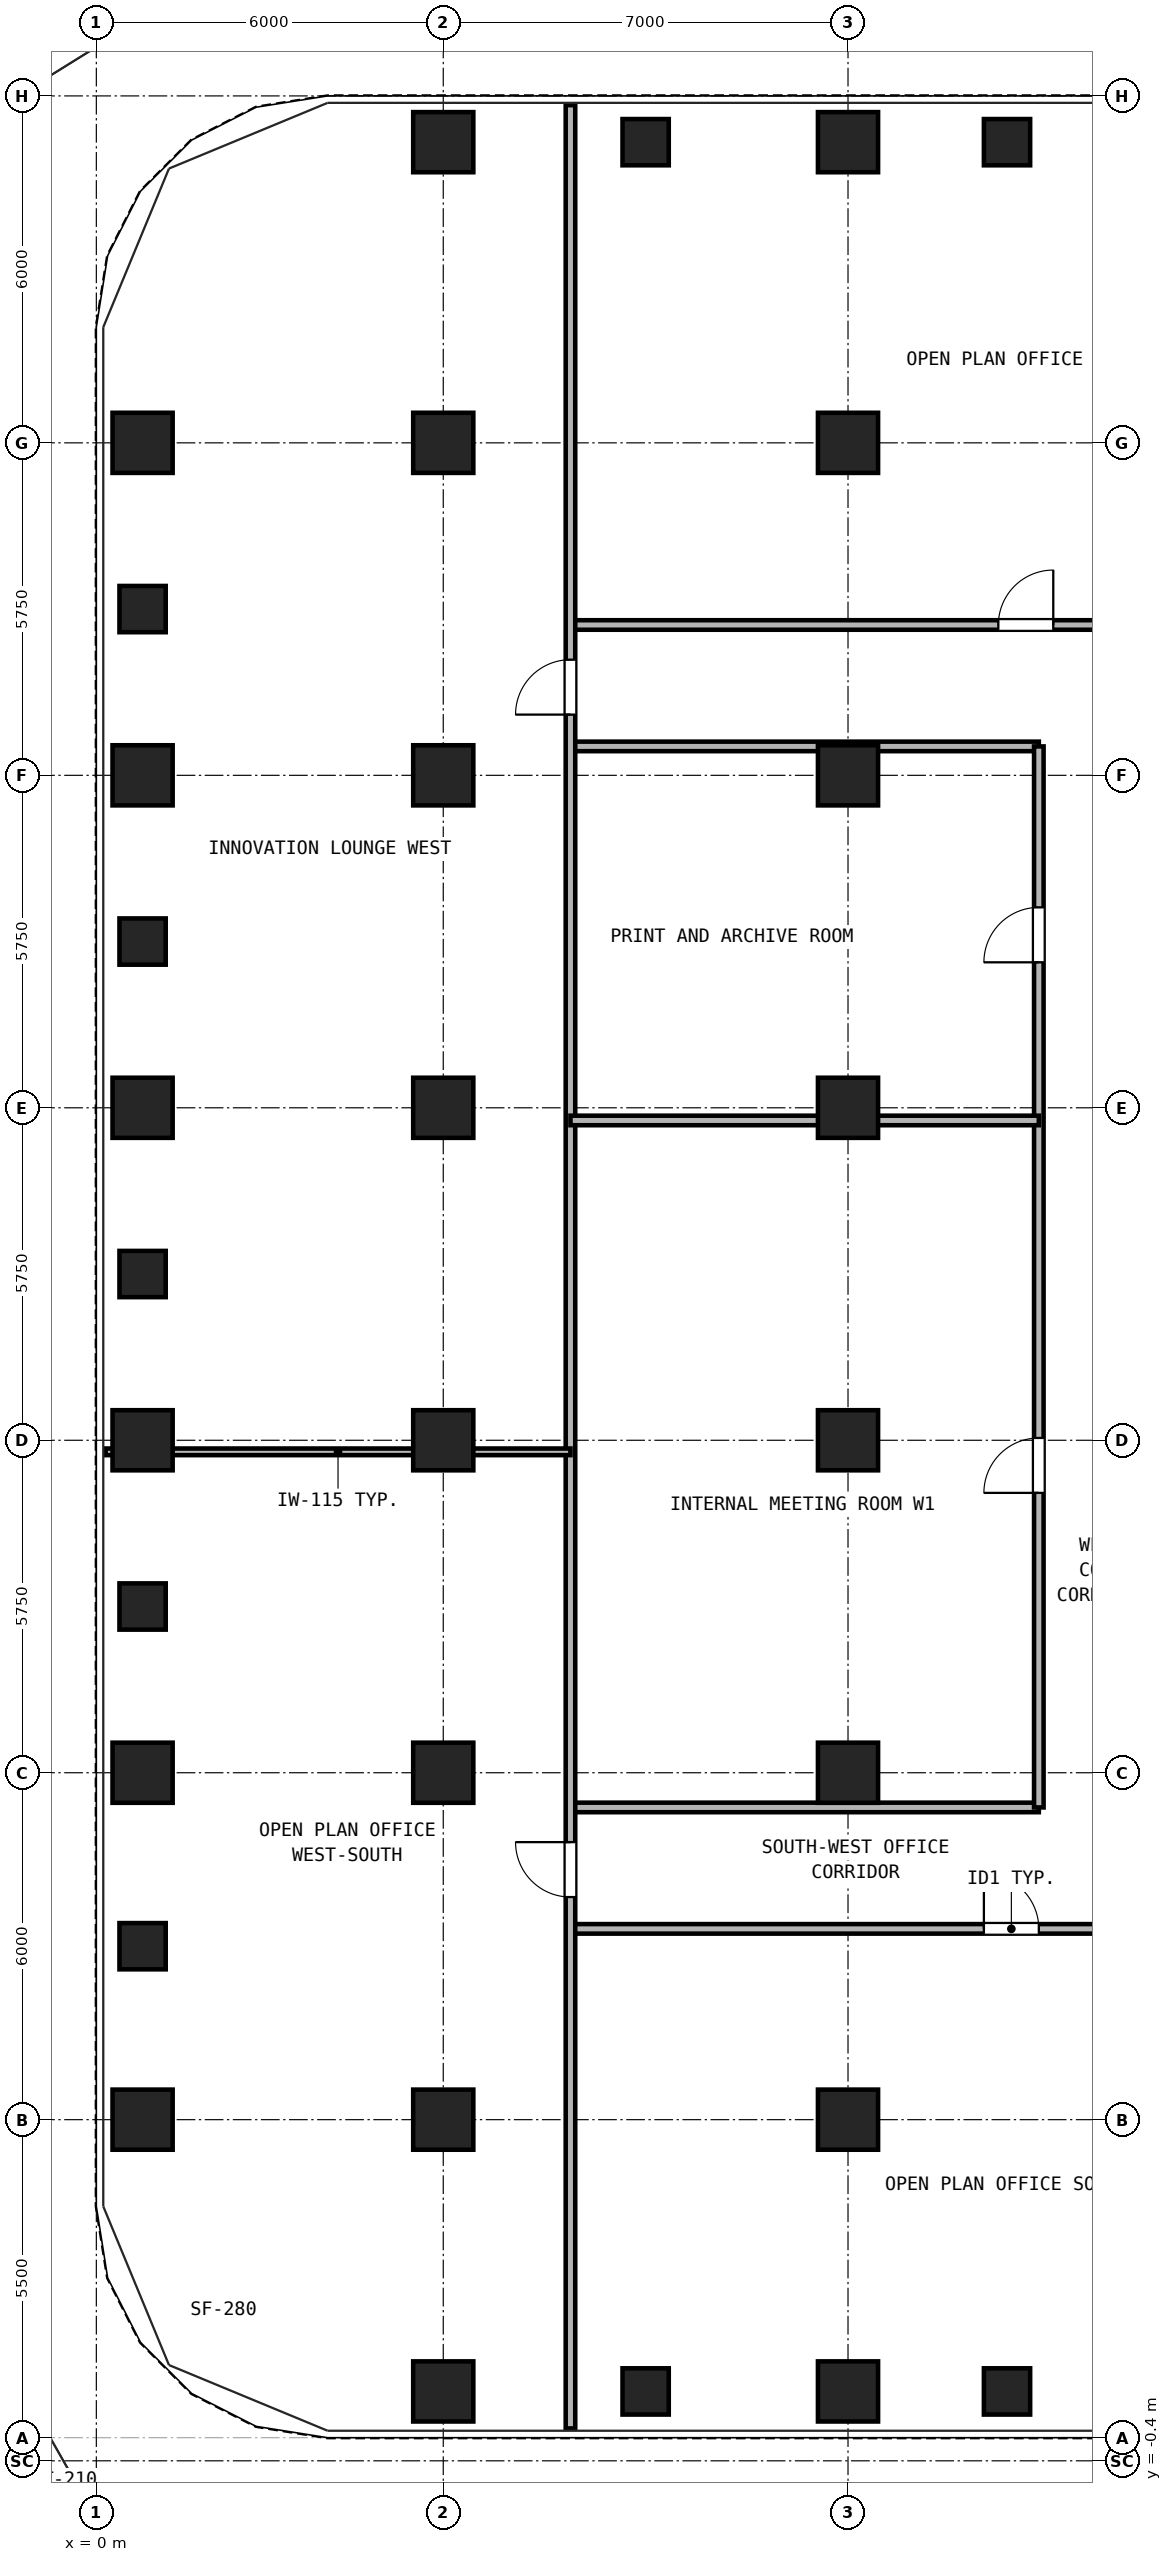
"""IFC4 building model, lengths in metres.
Left out: names, types, materials, properties, quantities, classifications, styles, units other than length and angle.
Written with IfcOpenShell. Run it as: python <this file> out.ifc"""

import sys

from ifc_helpers import new_model, si_unit, direction, frame, frame_2d, origin, origin_2d, place, context, subcontext, project, spatial, rectangle, hollow_rectangle, extrude, source, transform, mapped, element, fill, save


model = new_model("IFC4")
c1 = context("Model", 3, precision=1e-05, world=origin(), true_north=direction((0.0, 1.0)))
c2 = subcontext(c1, "Body", "Model", "MODEL_VIEW")
j1 = project(units=[si_unit("LENGTHUNIT", "METRE"), si_unit("PLANEANGLEUNIT", "RADIAN")], contexts=[c1])
p1 = place(None, origin())
s1 = spatial("IfcSite", under=j1, at=p1, CompositionType="ELEMENT")
p2 = place(p1, origin())
s2 = spatial("IfcBuilding", under=s1, at=p2, CompositionType="ELEMENT")
p3 = place(p2, frame((0.0, 0.0, 26.1)))
s3 = spatial("IfcBuildingStorey", under=s2, at=p3, CompositionType="ELEMENT", Elevation=26.1)
m1 = source(origin(), c2, "Body", "SweptSolid", [
    extrude(hollow_rectangle(XDim=1.04, YDim=1.04, WallThickness=0.065, at=origin_2d()), origin(), (0.0, 0.0, 1.0), 3.32),
])
for number, where, z_axis, x_axis in (
    (1, (6.0, 0.8, 0.0), (0.0, 0.0, 1.0), (1.0, 0.0, 0.0)),
    (2, (6.0, 39.7, 0.0), (0.0, 0.0, 1.0), (1.0, 0.0, 0.0)),
    (3, (13.0, 0.8, 0.0), (0.0, 0.0, 1.0), (1.0, 0.0, 0.0)),
    (4, (13.0, 39.7, 0.0), (0.0, 0.0, 1.0), (1.0, 0.0, 0.0)),
    (5, (0.8, 5.5, 0.0), (0.0, 0.0, 1.0), (1.0, 0.0, 0.0)),
    (6, (0.8, 11.5, 0.0), (0.0, 0.0, 1.0), (1.0, 0.0, 0.0)),
    (7, (0.8, 17.25, 0.0), (0.0, 0.0, 1.0), (1.0, 0.0, 0.0)),
    (8, (0.8, 23.0, 0.0), (0.0, 0.0, 1.0), (1.0, 0.0, 0.0)),
    (9, (0.8, 28.75, 0.0), (0.0, 0.0, 1.0), (1.0, 0.0, 0.0)),
    (10, (0.8, 34.5, 0.0), (0.0, 0.0, 1.0), (1.0, 0.0, 0.0)),
    (11, (6.0, 5.5, 0.0), (0.0, 0.0, 1.0), (1.0, 0.0, 0.0)),
    (12, (6.0, 11.5, 0.0), (0.0, 0.0, 1.0), (1.0, 0.0, 0.0)),
    (13, (6.0, 17.25, 0.0), (0.0, 0.0, 1.0), (1.0, 0.0, 0.0)),
    (14, (6.0, 23.0, 0.0), (0.0, 0.0, 1.0), (1.0, 0.0, 0.0)),
    (15, (6.0, 28.75, 0.0), (0.0, 0.0, 1.0), (1.0, 0.0, 0.0)),
    (16, (6.0, 34.5, 0.0), (0.0, 0.0, 1.0), (1.0, 0.0, 0.0)),
    (17, (13.0, 5.5, 0.0), (0.0, 0.0, 1.0), (1.0, 0.0, 0.0)),
    (18, (13.0, 11.5, 0.0), (0.0, 0.0, 1.0), (1.0, 0.0, 0.0)),
    (19, (13.0, 17.25, 0.0), (0.0, 0.0, 1.0), (1.0, 0.0, 0.0)),
    (20, (13.0, 23.0, 0.0), (0.0, 0.0, 1.0), (1.0, 0.0, 0.0)),
    (21, (13.0, 28.75, 0.0), (0.0, 0.0, 1.0), (1.0, 0.0, 0.0)),
    (22, (13.0, 34.5, 0.0), (0.0, 0.0, 1.0), (1.0, 0.0, 0.0)),
):
    element("IfcColumn", number, at=place(p3, frame(where, z_axis=z_axis, x_axis=x_axis)), inside=s3, PredefinedType="COLUMN", context=c2, shape_type="MappedRepresentation", body=[
        mapped(m1, transform((0.0, 0.0, 0.0), x_axis=(1.0, 0.0, 0.0), y_axis=(0.0, 1.0, 0.0), z_axis=(0.0, 0.0, 1.0), scale=1.0)),
    ])
m2 = source(origin(), c2, "Body", "SweptSolid", [
    extrude(hollow_rectangle(XDim=0.8, YDim=0.8, WallThickness=0.045, at=origin_2d()), origin(), (0.0, 0.0, 1.0), 3.32),
])
for number, where, z_axis, x_axis in (
    (23, (9.5, 0.8, 0.0), (0.0, 0.0, 1.0), (1.0, 0.0, 0.0)),
    (24, (9.5, 39.7, 0.0), (0.0, 0.0, 1.0), (1.0, 0.0, 0.0)),
    (25, (15.75, 0.8, 0.0), (0.0, 0.0, 1.0), (1.0, 0.0, 0.0)),
    (26, (15.75, 39.7, 0.0), (0.0, 0.0, 1.0), (1.0, 0.0, 0.0)),
    (27, (0.8, 8.5, 0.0), (0.0, 0.0, 1.0), (1.0, 0.0, 0.0)),
    (28, (0.8, 14.375, 0.0), (0.0, 0.0, 1.0), (1.0, 0.0, 0.0)),
    (29, (0.8, 20.125, 0.0), (0.0, 0.0, 1.0), (1.0, 0.0, 0.0)),
    (30, (0.8, 25.875, 0.0), (0.0, 0.0, 1.0), (1.0, 0.0, 0.0)),
    (31, (0.8, 31.625, 0.0), (0.0, 0.0, 1.0), (1.0, 0.0, 0.0)),
):
    element("IfcColumn", number, at=place(p3, frame(where, z_axis=z_axis, x_axis=x_axis)), inside=s3, PredefinedType="COLUMN", context=c2, shape_type="MappedRepresentation", body=[
        mapped(m2, transform((0.0, 0.0, 0.0), x_axis=(1.0, 0.0, 0.0), y_axis=(0.0, 1.0, 0.0), z_axis=(0.0, 0.0, 1.0), scale=1.0)),
    ])
p4 = place(p3, frame((8.2, 8.8, 0.0), z_axis=(0.0, 0.0, 1.0), x_axis=(1.0, 0.0, 0.0)))
e32 = element("IfcWall", 32, at=p4, inside=s3, PredefinedType="PARTITIONING", context=c2, shape_type="SweptSolid", body=[
    extrude(rectangle(XDim=30.6, YDim=0.165, at=frame_2d((15.3, 0.0))), origin(), (0.0, 0.0, 1.0), 3.32),
])
p5 = place(p4, frame((7.15, 0.0, 0.0)))
e33 = element("IfcOpeningElement", 33, at=p5, cuts=e32, PredefinedType="OPENING", context=c2, shape_type="SweptSolid", body=[
    extrude(rectangle(XDim=0.95, YDim=2.15, at=frame_2d((0.475, 1.075))), frame((0.0, 0.093, 0.0), z_axis=(0.0, -1.0, 0.0), x_axis=(1.0, 0.0, 0.0)), (0.0, 0.0, 1.0), 0.185),
])
p6 = place(p4, frame((19.05, 0.0, 0.0)))
e34 = element("IfcOpeningElement", 34, at=p6, cuts=e32, PredefinedType="OPENING", context=c2, shape_type="SweptSolid", body=[
    extrude(rectangle(XDim=0.95, YDim=2.15, at=frame_2d((0.475, 1.075))), frame((0.0, 0.093, 0.0), z_axis=(0.0, -1.0, 0.0), x_axis=(1.0, 0.0, 0.0)), (0.0, 0.0, 1.0), 0.185),
])
p7 = place(p4, frame((24.3, 0.0, 0.0)))
e35 = element("IfcOpeningElement", 35, at=p7, cuts=e32, PredefinedType="OPENING", context=c2, shape_type="SweptSolid", body=[
    extrude(rectangle(XDim=0.95, YDim=2.15, at=frame_2d((0.475, 1.075))), frame((0.0, 0.093, 0.0), z_axis=(0.0, -1.0, 0.0), x_axis=(1.0, 0.0, 0.0)), (0.0, 0.0, 1.0), 0.185),
])
p8 = place(p4, frame((26.5, 0.0, 0.0)))
e36 = element("IfcOpeningElement", 36, at=p8, cuts=e32, PredefinedType="OPENING", context=c2, shape_type="SweptSolid", body=[
    extrude(rectangle(XDim=0.92, YDim=2.1, at=frame_2d((0.46, 1.05))), frame((0.0, 0.093, 0.0), z_axis=(0.0, -1.0, 0.0), x_axis=(1.0, 0.0, 0.0)), (0.0, 0.0, 1.0), 0.185),
])
p9 = place(p4, frame((28.9, 0.0, 0.0)))
e37 = element("IfcOpeningElement", 37, at=p9, cuts=e32, PredefinedType="OPENING", context=c2, shape_type="SweptSolid", body=[
    extrude(rectangle(XDim=0.92, YDim=2.1, at=frame_2d((0.46, 1.05))), frame((0.0, 0.093, 0.0), z_axis=(0.0, -1.0, 0.0), x_axis=(1.0, 0.0, 0.0)), (0.0, 0.0, 1.0), 0.185),
])
p10 = place(p3, frame((8.2, 31.35, 0.0), z_axis=(0.0, 0.0, 1.0), x_axis=(1.0, 0.0, 0.0)))
e38 = element("IfcWall", 38, at=p10, inside=s3, PredefinedType="PARTITIONING", context=c2, shape_type="SweptSolid", body=[
    extrude(rectangle(XDim=30.6, YDim=0.165, at=frame_2d((15.3, 0.0))), origin(), (0.0, 0.0, 1.0), 3.32),
])
p11 = place(p10, frame((7.4, 0.0, 0.0)))
e39 = element("IfcOpeningElement", 39, at=p11, cuts=e38, PredefinedType="OPENING", context=c2, shape_type="SweptSolid", body=[
    extrude(rectangle(XDim=0.95, YDim=2.15, at=frame_2d((0.475, 1.075))), frame((0.0, 0.093, 0.0), z_axis=(0.0, -1.0, 0.0), x_axis=(1.0, 0.0, 0.0)), (0.0, 0.0, 1.0), 0.185),
])
p12 = place(p10, frame((22.7, 0.0, 0.0)))
e40 = element("IfcOpeningElement", 40, at=p12, cuts=e38, PredefinedType="OPENING", context=c2, shape_type="SweptSolid", body=[
    extrude(rectangle(XDim=0.95, YDim=2.15, at=frame_2d((0.475, 1.075))), frame((0.0, 0.093, 0.0), z_axis=(0.0, -1.0, 0.0), x_axis=(1.0, 0.0, 0.0)), (0.0, 0.0, 1.0), 0.185),
])
for number, where, z_axis, x_axis in (
    (41, (8.2, 10.9, 0.0), (0.0, 0.0, 1.0), (1.0, 0.0, 0.0)),
    (42, (8.2, 29.25, 0.0), (0.0, 0.0, 1.0), (1.0, 0.0, 0.0)),
):
    element("IfcWall", number, at=place(p3, frame(where, z_axis=z_axis, x_axis=x_axis)), inside=s3, PredefinedType="PARTITIONING", context=c2, shape_type="SweptSolid", body=[
        extrude(rectangle(XDim=8.1, YDim=0.165, at=frame_2d((4.05, 0.0))), origin(), (0.0, 0.0, 1.0), 3.32),
    ])
p13 = place(p3, frame((16.3, 10.9, 0.0), z_axis=(0.0, 0.0, 1.0), x_axis=(0.0, 1.0, 0.0)))
e43 = element("IfcWall", 43, at=p13, inside=s3, PredefinedType="PARTITIONING", context=c2, shape_type="SweptSolid", body=[
    extrude(rectangle(XDim=18.35, YDim=0.165, at=frame_2d((9.175, 0.0))), origin(), (0.0, 0.0, 1.0), 3.32),
])
p14 = place(p13, frame((5.44, 0.0, 0.0)))
e44 = element("IfcOpeningElement", 44, at=p14, cuts=e43, PredefinedType="OPENING", context=c2, shape_type="SweptSolid", body=[
    extrude(rectangle(XDim=0.95, YDim=2.15, at=frame_2d((0.475, 1.075))), frame((0.0, 0.093, 0.0), z_axis=(0.0, -1.0, 0.0), x_axis=(1.0, 0.0, 0.0)), (0.0, 0.0, 1.0), 0.185),
])
p15 = place(p13, frame((14.616, 0.0, 0.0)))
e45 = element("IfcOpeningElement", 45, at=p15, cuts=e43, PredefinedType="OPENING", context=c2, shape_type="SweptSolid", body=[
    extrude(rectangle(XDim=0.95, YDim=2.15, at=frame_2d((0.475, 1.075))), frame((0.0, 0.093, 0.0), z_axis=(0.0, -1.0, 0.0), x_axis=(1.0, 0.0, 0.0)), (0.0, 0.0, 1.0), 0.185),
])
p16 = place(p3, frame((8.2, 0.16, 0.0), z_axis=(0.0, 0.0, 1.0), x_axis=(0.0, 1.0, 0.0)))
e46 = element("IfcWall", 46, at=p16, inside=s3, PredefinedType="PARTITIONING", context=c2, shape_type="SweptSolid", body=[
    extrude(rectangle(XDim=40.18, YDim=0.165, at=frame_2d((20.09, 0.0))), origin(), (0.0, 0.0, 1.0), 3.32),
])
p17 = place(p16, frame((9.19, 0.0, 0.0)))
e47 = element("IfcOpeningElement", 47, at=p17, cuts=e46, PredefinedType="OPENING", context=c2, shape_type="SweptSolid", body=[
    extrude(rectangle(XDim=0.95, YDim=2.15, at=frame_2d((0.475, 1.075))), frame((0.0, 0.093, 0.0), z_axis=(0.0, -1.0, 0.0), x_axis=(1.0, 0.0, 0.0)), (0.0, 0.0, 1.0), 0.185),
])
p18 = place(p16, frame((29.64, 0.0, 0.0)))
e48 = element("IfcOpeningElement", 48, at=p18, cuts=e46, PredefinedType="OPENING", context=c2, shape_type="SweptSolid", body=[
    extrude(rectangle(XDim=0.95, YDim=2.15, at=frame_2d((0.475, 1.075))), frame((0.0, 0.093, 0.0), z_axis=(0.0, -1.0, 0.0), x_axis=(1.0, 0.0, 0.0)), (0.0, 0.0, 1.0), 0.185),
])
p19 = place(p3, frame((0.16, 17.05, 0.0), z_axis=(0.0, 0.0, 1.0), x_axis=(1.0, 0.0, 0.0)))
e49 = element("IfcWall", 49, at=p19, inside=s3, PredefinedType="PARTITIONING", context=c2, shape_type="SweptSolid", body=[
    extrude(rectangle(XDim=8.04, YDim=0.115, at=frame_2d((4.02, 0.0))), origin(), (0.0, 0.0, 1.0), 2.539),
])
p20 = place(p3, frame((8.2, 22.781, 0.0), z_axis=(0.0, 0.0, 1.0), x_axis=(1.0, 0.0, 0.0)))
e50 = element("IfcWall", 50, at=p20, inside=s3, PredefinedType="PARTITIONING", context=c2, shape_type="SweptSolid", body=[
    extrude(rectangle(XDim=8.1, YDim=0.165, at=frame_2d((4.05, 0.0))), origin(), (0.0, 0.0, 1.0), 2.539),
])
p21 = place(p5, frame((0.95, 0.0, 0.0), z_axis=(0.0, 0.0, 1.0), x_axis=(-1.0, 0.0, 0.0)))
e51 = element("IfcDoor", 51, at=p21, inside=s3, OperationType="SINGLE_SWING_LEFT", PredefinedType="DOOR", context=c2, shape_type="SweptSolid", body=[
    extrude(rectangle(XDim=0.95, YDim=2.15, at=frame_2d((0.475, 1.075))), frame((0.0, 0.025, 0.0), z_axis=(0.0, -1.0, 0.0), x_axis=(1.0, 0.0, 0.0)), (0.0, 0.0, 1.0), 0.05),
])
fill(e33, e51)
p22 = place(p11, origin())
e52 = element("IfcDoor", 52, at=p22, inside=s3, OperationType="SINGLE_SWING_RIGHT", PredefinedType="DOOR", context=c2, shape_type="SweptSolid", body=[
    extrude(rectangle(XDim=0.95, YDim=2.15, at=frame_2d((0.475, 1.075))), frame((0.0, 0.025, 0.0), z_axis=(0.0, -1.0, 0.0), x_axis=(1.0, 0.0, 0.0)), (0.0, 0.0, 1.0), 0.05),
])
fill(e39, e52)
p23 = place(p17, frame((0.95, 0.0, 0.0), z_axis=(0.0, 0.0, 1.0), x_axis=(-1.0, 0.0, 0.0)))
e53 = element("IfcDoor", 53, at=p23, inside=s3, OperationType="SINGLE_SWING_RIGHT", PredefinedType="DOOR", context=c2, shape_type="SweptSolid", body=[
    extrude(rectangle(XDim=0.95, YDim=2.15, at=frame_2d((0.475, 1.075))), frame((0.0, 0.025, 0.0), z_axis=(0.0, -1.0, 0.0), x_axis=(1.0, 0.0, 0.0)), (0.0, 0.0, 1.0), 0.05),
])
fill(e47, e53)
p24 = place(p18, frame((0.95, 0.0, 0.0), z_axis=(0.0, 0.0, 1.0), x_axis=(-1.0, 0.0, 0.0)))
e54 = element("IfcDoor", 54, at=p24, inside=s3, OperationType="SINGLE_SWING_LEFT", PredefinedType="DOOR", context=c2, shape_type="SweptSolid", body=[
    extrude(rectangle(XDim=0.95, YDim=2.15, at=frame_2d((0.475, 1.075))), frame((0.0, 0.025, 0.0), z_axis=(0.0, -1.0, 0.0), x_axis=(1.0, 0.0, 0.0)), (0.0, 0.0, 1.0), 0.05),
])
fill(e48, e54)
p25 = place(p14, frame((0.95, 0.0, 0.0), z_axis=(0.0, 0.0, 1.0), x_axis=(-1.0, 0.0, 0.0)))
e55 = element("IfcDoor", 55, at=p25, inside=s3, OperationType="SINGLE_SWING_LEFT", PredefinedType="DOOR", context=c2, shape_type="SweptSolid", body=[
    extrude(rectangle(XDim=0.95, YDim=2.15, at=frame_2d((0.475, 1.075))), frame((0.0, 0.025, 0.0), z_axis=(0.0, -1.0, 0.0), x_axis=(1.0, 0.0, 0.0)), (0.0, 0.0, 1.0), 0.05),
])
fill(e44, e55)
p26 = place(p15, frame((0.95, 0.0, 0.0), z_axis=(0.0, 0.0, 1.0), x_axis=(-1.0, 0.0, 0.0)))
e56 = element("IfcDoor", 56, at=p26, inside=s3, OperationType="SINGLE_SWING_LEFT", PredefinedType="DOOR", context=c2, shape_type="SweptSolid", body=[
    extrude(rectangle(XDim=0.95, YDim=2.15, at=frame_2d((0.475, 1.075))), frame((0.0, 0.025, 0.0), z_axis=(0.0, -1.0, 0.0), x_axis=(1.0, 0.0, 0.0)), (0.0, 0.0, 1.0), 0.05),
])
fill(e45, e56)
save(model, sys.argv[1])
